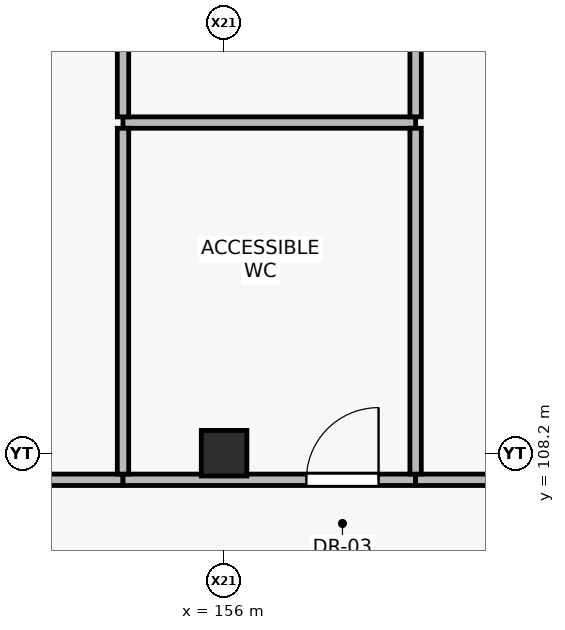
"""IFC4 building model, lengths in metres.
Left out: names, types, materials, properties, quantities, classifications, styles, units other than length and angle.
Written with IfcOpenShell. Run it as: python <this file> out.ifc"""

import sys

from ifc_helpers import new_model, si_unit, direction, frame, frame_2d, origin, origin_2d, place, context, subcontext, project, spatial, rectangle, extrude, element, fill, save


model = new_model("IFC4")
c1 = context("Model", 3, precision=1e-05, world=origin(), true_north=direction((0.0, 1.0)))
c2 = subcontext(c1, "Body", "Model", "MODEL_VIEW")
j1 = project(units=[si_unit("LENGTHUNIT", "METRE"), si_unit("PLANEANGLEUNIT", "RADIAN")], contexts=[c1])
p1 = place(None, origin())
s1 = spatial("IfcSite", under=j1, at=p1, CompositionType="ELEMENT")
p2 = place(p1, origin())
s2 = spatial("IfcBuilding", under=s1, at=p2, CompositionType="ELEMENT")
p3 = place(p2, frame((0.0, 0.0, 4.8)))
s3 = spatial("IfcBuildingStorey", under=s2, at=p3, CompositionType="ELEMENT", Elevation=4.8)
p4 = place(p3, frame((156.0, 108.2, 0.0), z_axis=(0.0, 0.0, 1.0), x_axis=(1.0, 0.0, 0.0)))
e1 = element("IfcColumn", 1, at=p4, inside=s3, PredefinedType="COLUMN", context=c2, shape_type="SweptSolid", body=[
    extrude(rectangle(XDim=0.6, YDim=0.6, at=origin_2d()), origin(), (0.0, 0.0, 1.0), 4.8),
])
p5 = place(p3, frame((150.32, 107.85, 0.0), z_axis=(0.0, 0.0, 1.0), x_axis=(1.0, 0.0, 0.0)))
e2 = element("IfcWall", 2, at=p5, inside=s3, PredefinedType="PARTITIONING", context=c2, shape_type="SweptSolid", body=[
    extrude(rectangle(XDim=4.35, YDim=0.15, at=frame_2d((2.175, 0.0))), origin(), (0.0, 0.0, 1.0), 4.04),
])
p6 = place(p5, frame((1.535, 0.0, 0.0)))
e3 = element("IfcOpeningElement", 3, at=p6, cuts=e2, PredefinedType="OPENING", context=c2, shape_type="SweptSolid", body=[
    extrude(rectangle(XDim=1.28, YDim=2.25, at=frame_2d((0.64, 1.125))), frame((0.0, 0.085, 0.0), z_axis=(0.0, -1.0, 0.0), x_axis=(1.0, 0.0, 0.0)), (0.0, 0.0, 1.0), 0.17),
])
p7 = place(p3, frame((154.67, 107.85, 0.0), z_axis=(0.0, 0.0, 1.0), x_axis=(1.0, 0.0, 0.0)))
e4 = element("IfcWall", 4, at=p7, inside=s3, PredefinedType="PARTITIONING", context=c2, shape_type="SweptSolid", body=[
    extrude(rectangle(XDim=3.85, YDim=0.15, at=frame_2d((1.925, 0.0))), origin(), (0.0, 0.0, 1.0), 4.04),
])
p8 = place(p7, frame((2.413, 0.0, 0.0)))
e5 = element("IfcOpeningElement", 5, at=p8, cuts=e4, PredefinedType="OPENING", context=c2, shape_type="SweptSolid", body=[
    extrude(rectangle(XDim=0.95, YDim=2.1, at=frame_2d((0.475, 1.05))), frame((0.0, 0.085, 0.0), z_axis=(0.0, -1.0, 0.0), x_axis=(1.0, 0.0, 0.0)), (0.0, 0.0, 1.0), 0.17),
])
p9 = place(p3, frame((154.67, 112.55, 0.0), z_axis=(0.0, 0.0, 1.0), x_axis=(1.0, 0.0, 0.0)))
e6 = element("IfcWall", 6, at=p9, inside=s3, PredefinedType="PARTITIONING", context=c2, shape_type="SweptSolid", body=[
    extrude(rectangle(XDim=3.85, YDim=0.15, at=frame_2d((1.925, 0.0))), origin(), (0.0, 0.0, 1.0), 4.54),
])
p10 = place(p3, frame((158.52, 107.85, 0.0), z_axis=(0.0, 0.0, 1.0), x_axis=(1.0, 0.0, 0.0)))
e7 = element("IfcWall", 7, at=p10, inside=s3, PredefinedType="PARTITIONING", context=c2, shape_type="SweptSolid", body=[
    extrude(rectangle(XDim=4.95, YDim=0.15, at=frame_2d((2.475, 0.0))), origin(), (0.0, 0.0, 1.0), 4.04),
])
p11 = place(p10, frame((1.615, 0.0, 0.0)))
e8 = element("IfcOpeningElement", 8, at=p11, cuts=e7, PredefinedType="OPENING", context=c2, shape_type="SweptSolid", body=[
    extrude(rectangle(XDim=1.72, YDim=2.3, at=frame_2d((0.86, 1.15))), frame((0.0, 0.085, 0.0), z_axis=(0.0, -1.0, 0.0), x_axis=(1.0, 0.0, 0.0)), (0.0, 0.0, 1.0), 0.17),
])
p12 = place(p3, frame((154.67, 107.925, 0.0), z_axis=(0.0, 0.0, 1.0), x_axis=(0.0, 1.0, 0.0)))
e9 = element("IfcWall", 9, at=p12, inside=s3, PredefinedType="PARTITIONING", context=c2, shape_type="SweptSolid", body=[
    extrude(rectangle(XDim=4.55, YDim=0.15, at=frame_2d((2.275, 0.0))), origin(), (0.0, 0.0, 1.0), 4.54),
])
p13 = place(p3, frame((154.67, 112.625, 0.0), z_axis=(0.0, 0.0, 1.0), x_axis=(0.0, 1.0, 0.0)))
e10 = element("IfcWall", 10, at=p13, inside=s3, PredefinedType="PARTITIONING", context=c2, shape_type="SweptSolid", body=[
    extrude(rectangle(XDim=3.205, YDim=0.15, at=frame_2d((1.603, 0.0))), origin(), (0.0, 0.0, 1.0), 4.54),
])
p14 = place(p3, frame((158.52, 107.925, 0.0), z_axis=(0.0, 0.0, 1.0), x_axis=(0.0, 1.0, 0.0)))
e11 = element("IfcWall", 11, at=p14, inside=s3, PredefinedType="PARTITIONING", context=c2, shape_type="SweptSolid", body=[
    extrude(rectangle(XDim=4.55, YDim=0.15, at=frame_2d((2.275, 0.0))), origin(), (0.0, 0.0, 1.0), 4.21),
])
p15 = place(p3, frame((158.52, 112.625, 0.0), z_axis=(0.0, 0.0, 1.0), x_axis=(0.0, 1.0, 0.0)))
e12 = element("IfcWall", 12, at=p15, inside=s3, PredefinedType="PARTITIONING", context=c2, shape_type="SweptSolid", body=[
    extrude(rectangle(XDim=3.205, YDim=0.15, at=frame_2d((1.603, 0.0))), origin(), (0.0, 0.0, 1.0), 4.21),
])
p16 = place(p8, origin())
e13 = element("IfcDoor", 13, at=p16, inside=s3, OperationType="SINGLE_SWING_RIGHT", PredefinedType="DOOR", context=c2, shape_type="SweptSolid", body=[
    extrude(rectangle(XDim=0.95, YDim=2.1, at=frame_2d((0.475, 1.05))), frame((0.0, 0.025, 0.0), z_axis=(0.0, -1.0, 0.0), x_axis=(1.0, 0.0, 0.0)), (0.0, 0.0, 1.0), 0.05),
])
fill(e5, e13)
save(model, sys.argv[1])
